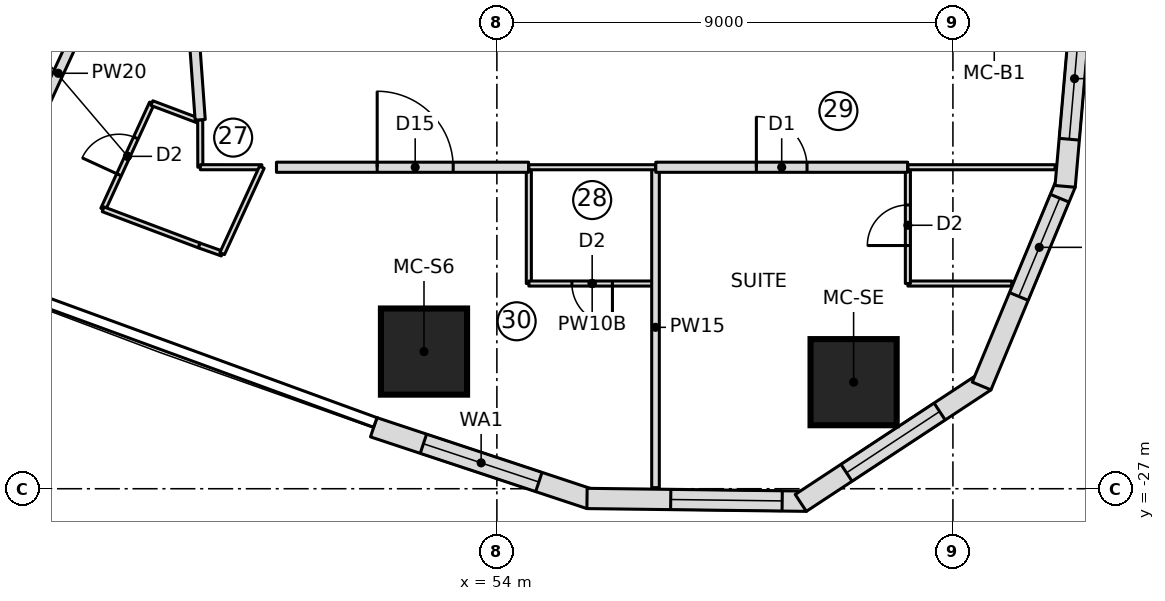
"""IFC4 building model, lengths in metres.
Left out: names, types, materials, properties, quantities, classifications, styles, units other than length and angle.
Written with IfcOpenShell. Run it as: python <this file> out.ifc"""

import sys

from ifc_helpers import new_model, si_unit, direction, frame, frame_2d, origin, origin_2d, place, context, subcontext, project, spatial, polyline, rectangle, outline, extrude, element, fill, save


model = new_model("IFC4")
c1 = context("Model", 3, precision=1e-05, world=origin(), true_north=direction((0.0, 1.0)))
c2 = subcontext(c1, "Body", "Model", "MODEL_VIEW")
j1 = project(units=[si_unit("LENGTHUNIT", "METRE"), si_unit("PLANEANGLEUNIT", "RADIAN")], contexts=[c1])
p1 = place(None, origin())
s1 = spatial("IfcSite", under=j1, at=p1, CompositionType="ELEMENT")
p2 = place(p1, origin())
s2 = spatial("IfcBuilding", under=s1, at=p2, CompositionType="ELEMENT")
p3 = place(p2, frame((0.0, 0.0, 88.45)))
s3 = spatial("IfcBuildingStorey", under=s2, at=p3, CompositionType="ELEMENT", Elevation=88.45)
for number, where, z_axis, x_axis in (
    (1, (52.562, -24.293, 0.0), (0.0, 0.0, 1.0), (1.0, 0.0, 0.0)),
    (2, (61.04, -24.897, 0.0), (0.0, 0.0, 1.0), (1.0, 0.0, 0.0)),
):
    element("IfcColumn", number, at=place(p3, frame(where, z_axis=z_axis, x_axis=x_axis)), inside=s3, PredefinedType="COLUMN", context=c2, shape_type="SweptSolid", body=[
        extrude(rectangle(XDim=1.7, YDim=1.7, at=origin_2d()), origin(), (0.0, 0.0, 1.0), 3.55),
    ])
p4 = place(p3, frame((51.569, -25.787, 0.0), z_axis=(0.0, 0.0, 1.0), x_axis=(0.94925004851, -0.314522408429, 0.0)))
e3 = element("IfcWall", 3, at=p4, inside=s3, PredefinedType="NOTDEFINED", context=c2, shape_type="SweptSolid", body=[
    extrude(outline(polyline([(0.0, -0.2), (4.499, -0.2), (4.437, 0.2), (0.0, 0.2), (0.0, -0.2)])), origin(), (0.0, 0.0, 1.0), 3.25),
])
p5 = place(p4, frame((1.034, 0.0, 0.5)))
e4 = element("IfcOpeningElement", 4, at=p5, cuts=e3, PredefinedType="OPENING", context=c2, shape_type="SweptSolid", body=[
    extrude(rectangle(XDim=2.4, YDim=2.0, at=frame_2d((1.2, 1.0))), frame((0.0, 0.21, 0.0), z_axis=(0.0, -1.0, 0.0), x_axis=(1.0, 0.0, 0.0)), (0.0, 0.0, 1.0), 0.42),
])
p6 = place(p3, frame((55.81, -27.192, 0.0), z_axis=(0.0, 0.0, 1.0), x_axis=(0.999919718849, -0.012671063772, 0.0)))
e5 = element("IfcWall", 5, at=p6, inside=s3, PredefinedType="NOTDEFINED", context=c2, shape_type="SweptSolid", body=[
    extrude(outline(polyline([(-0.031, -0.2), (4.3, -0.2), (4.177, 0.2), (0.031, 0.2), (-0.031, -0.2)])), origin(), (0.0, 0.0, 1.0), 3.25),
])
p7 = place(p6, frame((1.621, 0.0, 0.6)))
e6 = element("IfcOpeningElement", 6, at=p7, cuts=e5, PredefinedType="OPENING", context=c2, shape_type="SweptSolid", body=[
    extrude(outline(polyline([(0.0, 1.35), (0.084, 1.771), (0.322, 2.128), (0.679, 2.366), (1.1, 2.45), (1.521, 2.366), (1.878, 2.128), (2.116, 1.771), (2.2, 1.35), (2.2, 1.1), (2.116, 0.679), (1.878, 0.322), (1.521, 0.084), (1.1, 0.0), (0.679, 0.084), (0.322, 0.322), (0.084, 0.679), (0.0, 1.1), (0.0, 1.35)])), frame((0.0, 0.21, 0.0), z_axis=(0.0, -1.0, 0.0), x_axis=(1.0, 0.0, 0.0)), (0.0, 0.0, 1.0), 0.42),
])
p8 = place(p3, frame((60.049, -27.246, 0.0), z_axis=(0.0, 0.0, 1.0), x_axis=(0.835340523653, 0.549732852887, 0.0)))
e7 = element("IfcWall", 7, at=p8, inside=s3, PredefinedType="NOTDEFINED", context=c2, shape_type="SweptSolid", body=[
    extrude(outline(polyline([(-0.061, -0.2), (4.3, -0.2), (4.178, 0.2), (0.061, 0.2), (-0.061, -0.2)])), origin(), (0.0, 0.0, 1.0), 3.25),
])
p9 = place(p8, frame((1.02, 0.0, 0.6)))
e8 = element("IfcOpeningElement", 8, at=p9, cuts=e7, PredefinedType="OPENING", context=c2, shape_type="SweptSolid", body=[
    extrude(outline(polyline([(0.0, 1.35), (0.084, 1.771), (0.322, 2.128), (0.679, 2.366), (1.1, 2.45), (1.521, 2.366), (1.878, 2.128), (2.116, 1.771), (2.2, 1.35), (2.2, 1.1), (2.116, 0.679), (1.878, 0.322), (1.521, 0.084), (1.1, 0.0), (0.679, 0.084), (0.322, 0.322), (0.084, 0.679), (0.0, 1.1), (0.0, 1.35)])), frame((0.0, 0.21, 0.0), z_axis=(0.0, -1.0, 0.0), x_axis=(1.0, 0.0, 0.0)), (0.0, 0.0, 1.0), 0.42),
])
p10 = place(p3, frame((63.59, -24.916, 0.0), z_axis=(0.0, 0.0, 1.0), x_axis=(0.383997751971, 0.923334027577, 0.0)))
e9 = element("IfcWall", 9, at=p10, inside=s3, PredefinedType="NOTDEFINED", context=c2, shape_type="SweptSolid", body=[
    extrude(outline(polyline([(-0.061, -0.2), (4.27, -0.2), (4.208, 0.2), (0.061, 0.2), (-0.061, -0.2)])), origin(), (0.0, 0.0, 1.0), 3.25),
])
p11 = place(p10, frame((1.852, 0.0, 0.6)))
e10 = element("IfcOpeningElement", 10, at=p11, cuts=e9, PredefinedType="OPENING", context=c2, shape_type="SweptSolid", body=[
    extrude(outline(polyline([(0.0, 1.4), (0.08, 1.802), (0.308, 2.142), (0.648, 2.37), (1.05, 2.45), (1.452, 2.37), (1.792, 2.142), (2.02, 1.802), (2.1, 1.4), (2.1, 1.05), (2.02, 0.648), (1.792, 0.308), (1.452, 0.08), (1.05, 0.0), (0.648, 0.08), (0.308, 0.308), (0.08, 0.648), (0.0, 1.05), (0.0, 1.4)])), frame((0.0, 0.21, 0.0), z_axis=(0.0, -1.0, 0.0), x_axis=(1.0, 0.0, 0.0)), (0.0, 0.0, 1.0), 0.42),
])
p12 = place(p3, frame((65.217, -21.002, 0.0), z_axis=(0.0, 0.0, 1.0), x_axis=(0.086992730434, 0.996208946382, 0.0)))
e11 = element("IfcWall", 11, at=p12, inside=s3, PredefinedType="NOTDEFINED", context=c2, shape_type="SweptSolid", body=[
    extrude(outline(polyline([(-0.031, -0.2), (4.209, -0.2), (4.205, 0.2), (0.031, 0.2), (-0.031, -0.2)])), origin(), (0.0, 0.0, 1.0), 3.25),
])
p13 = place(p12, frame((0.903, 0.0, 0.5)))
e12 = element("IfcOpeningElement", 12, at=p13, cuts=e11, PredefinedType="OPENING", context=c2, shape_type="SweptSolid", body=[
    extrude(rectangle(XDim=2.4, YDim=2.0, at=frame_2d((1.2, 1.0))), frame((0.0, 0.21, 0.0), z_axis=(0.0, -1.0, 0.0), x_axis=(1.0, 0.0, 0.0)), (0.0, 0.0, 1.0), 0.42),
])
p14 = place(p3, frame((54.631, -22.95, 0.0), z_axis=(0.0, 0.0, 1.0), x_axis=(0.0, 1.0, 0.0)))
e13 = element("IfcWall", 13, at=p14, inside=s3, PredefinedType="PARTITIONING", context=c2, shape_type="SweptSolid", body=[
    extrude(rectangle(XDim=2.3, YDim=0.1, at=frame_2d((1.15, 0.0))), origin(), (0.0, 0.0, 1.0), 3.25),
])
p15 = place(p3, frame((57.131, -22.95, 0.0), z_axis=(0.0, 0.0, 1.0), x_axis=(-1.0, 0.0, 0.0)))
e14 = element("IfcWall", 14, at=p15, inside=s3, PredefinedType="PARTITIONING", context=c2, shape_type="SweptSolid", body=[
    extrude(rectangle(XDim=2.5, YDim=0.1, at=frame_2d((1.25, 0.0))), origin(), (0.0, 0.0, 1.0), 3.25),
])
p16 = place(p15, frame((0.85, 0.0, 0.0)))
e15 = element("IfcOpeningElement", 15, at=p16, cuts=e14, PredefinedType="OPENING", context=c2, shape_type="SweptSolid", body=[
    extrude(rectangle(XDim=0.8, YDim=2.1, at=frame_2d((0.4, 1.05))), frame((0.0, 0.06, 0.0), z_axis=(0.0, -1.0, 0.0), x_axis=(1.0, 0.0, 0.0)), (0.0, 0.0, 1.0), 0.12),
])
p17 = place(p3, frame((64.16, -22.95, 0.0), z_axis=(0.0, 0.0, 1.0), x_axis=(-1.0, 0.0, 0.0)))
e16 = element("IfcWall", 16, at=p17, inside=s3, PredefinedType="PARTITIONING", context=c2, shape_type="SweptSolid", body=[
    extrude(rectangle(XDim=2.049, YDim=0.1, at=frame_2d((1.025, 0.0))), origin(), (0.0, 0.0, 1.0), 3.25),
])
p18 = place(p3, frame((62.111, -22.95, 0.0), z_axis=(0.0, 0.0, 1.0), x_axis=(0.0, 1.0, 0.0)))
e17 = element("IfcWall", 17, at=p18, inside=s3, PredefinedType="PARTITIONING", context=c2, shape_type="SweptSolid", body=[
    extrude(rectangle(XDim=2.3, YDim=0.1, at=frame_2d((1.15, 0.0))), origin(), (0.0, 0.0, 1.0), 3.25),
])
p19 = place(p18, frame((0.75, 0.0, 0.0)))
e18 = element("IfcOpeningElement", 18, at=p19, cuts=e17, PredefinedType="OPENING", context=c2, shape_type="SweptSolid", body=[
    extrude(rectangle(XDim=0.8, YDim=2.1, at=frame_2d((0.4, 1.05))), frame((0.0, 0.06, 0.0), z_axis=(0.0, -1.0, 0.0), x_axis=(1.0, 0.0, 0.0)), (0.0, 0.0, 1.0), 0.12),
])
p20 = place(p3, frame((57.131, -26.979, 0.0), z_axis=(0.0, 0.0, 1.0), x_axis=(0.0, 1.0, 0.0)))
e19 = element("IfcWall", 19, at=p20, inside=s3, PredefinedType="PARTITIONING", context=c2, shape_type="SweptSolid", body=[
    extrude(rectangle(XDim=6.329, YDim=0.15, at=frame_2d((3.165, 0.0))), origin(), (0.0, 0.0, 1.0), 3.25),
])
p21 = place(p3, frame((43.752, -22.262, 0.0), z_axis=(0.0, 0.0, 1.0), x_axis=(0.417437957167, 0.908705426371, 0.0)))
e20 = element("IfcWall", 20, at=p21, inside=s3, PredefinedType="PARTITIONING", context=c2, shape_type="SweptSolid", body=[
    extrude(rectangle(XDim=7.619, YDim=0.2, at=frame_2d((3.81, 0.0))), origin(), (0.0, 0.0, 1.0), 3.25),
])
p22 = place(p3, frame((46.229, -21.485, 0.0), z_axis=(0.0, 0.0, 1.0), x_axis=(0.417405650341, 0.908720266674, 0.0)))
e21 = element("IfcWall", 21, at=p22, inside=s3, PredefinedType="PARTITIONING", context=c2, shape_type="SweptSolid", body=[
    extrude(rectangle(XDim=2.306, YDim=0.1, at=frame_2d((1.153, 0.0))), origin(), (0.0, 0.0, 1.0), 3.25),
])
p23 = place(p22, frame((0.75, 0.0, 0.0)))
e22 = element("IfcOpeningElement", 22, at=p23, cuts=e21, PredefinedType="OPENING", context=c2, shape_type="SweptSolid", body=[
    extrude(rectangle(XDim=0.8, YDim=2.1, at=frame_2d((0.4, 1.05))), frame((0.0, 0.06, 0.0), z_axis=(0.0, -1.0, 0.0), x_axis=(1.0, 0.0, 0.0)), (0.0, 0.0, 1.0), 0.12),
])
p24 = place(p3, frame((47.192, -19.39, 0.0), z_axis=(0.0, 0.0, 1.0), x_axis=(0.935855998994, -0.352382674301, 0.0)))
e23 = element("IfcWall", 23, at=p24, inside=s3, PredefinedType="PARTITIONING", context=c2, shape_type="SweptSolid", body=[
    extrude(rectangle(XDim=0.998, YDim=0.1, at=frame_2d((0.499, 0.0))), origin(), (0.0, 0.0, 1.0), 3.25),
])
p25 = place(p3, frame((48.579, -22.359, 0.0), z_axis=(0.0, 0.0, 1.0), x_axis=(-0.942878458172, 0.333136928476, 0.0)))
e24 = element("IfcWall", 24, at=p25, inside=s3, PredefinedType="PARTITIONING", context=c2, shape_type="SweptSolid", body=[
    extrude(rectangle(XDim=0.484, YDim=0.1, at=frame_2d((0.242, 0.0))), origin(), (0.0, 0.0, 1.0), 3.25),
])
p26 = place(p3, frame((48.123, -22.198, 0.0), z_axis=(0.0, 0.0, 1.0), x_axis=(-0.935872177073, 0.352339705654, 0.0)))
e25 = element("IfcWall", 25, at=p26, inside=s3, PredefinedType="PARTITIONING", context=c2, shape_type="SweptSolid", body=[
    extrude(rectangle(XDim=2.023, YDim=0.1, at=frame_2d((1.012, 0.0))), origin(), (0.0, 0.0, 1.0), 3.25),
])
p27 = place(p3, frame((49.65, -20.655, 0.0), z_axis=(0.0, 0.0, 1.0), x_axis=(1.0, 0.0, 0.0)))
e26 = element("IfcWall", 26, at=p27, inside=s3, PredefinedType="PARTITIONING", context=c2, shape_type="SweptSolid", body=[
    extrude(rectangle(XDim=4.976, YDim=0.2, at=frame_2d((2.488, 0.0))), origin(), (0.0, 0.0, 1.0), 3.25),
])
p28 = place(p27, frame((1.988, 0.0, 0.0)))
e27 = element("IfcOpeningElement", 27, at=p28, cuts=e26, PredefinedType="OPENING", context=c2, shape_type="SweptSolid", body=[
    extrude(rectangle(XDim=1.5, YDim=2.1, at=frame_2d((0.75, 1.05))), frame((0.0, 0.11, 0.0), z_axis=(0.0, -1.0, 0.0), x_axis=(1.0, 0.0, 0.0)), (0.0, 0.0, 1.0), 0.22),
])
p29 = place(p3, frame((57.135, -20.655, 0.0), z_axis=(0.0, 0.0, 1.0), x_axis=(1.0, 0.0, 0.0)))
e28 = element("IfcWall", 28, at=p29, inside=s3, PredefinedType="PARTITIONING", context=c2, shape_type="SweptSolid", body=[
    extrude(rectangle(XDim=4.971, YDim=0.2, at=frame_2d((2.485, 0.0))), origin(), (0.0, 0.0, 1.0), 3.25),
])
p30 = place(p29, frame((1.985, 0.0, 0.0)))
e29 = element("IfcOpeningElement", 29, at=p30, cuts=e28, PredefinedType="OPENING", context=c2, shape_type="SweptSolid", body=[
    extrude(rectangle(XDim=1.0, YDim=2.1, at=frame_2d((0.5, 1.05))), frame((0.0, 0.11, 0.0), z_axis=(0.0, -1.0, 0.0), x_axis=(1.0, 0.0, 0.0)), (0.0, 0.0, 1.0), 0.22),
])
p31 = place(p3, frame((54.631, -20.655, 0.0), z_axis=(0.0, 0.0, 1.0), x_axis=(1.0, 0.0, 0.0)))
e30 = element("IfcWall", 30, at=p31, inside=s3, PredefinedType="PARTITIONING", context=c2, shape_type="SweptSolid", body=[
    extrude(rectangle(XDim=2.5, YDim=0.1, at=frame_2d((1.25, 0.0))), origin(), (0.0, 0.0, 1.0), 3.25),
])
p32 = place(p3, frame((62.111, -20.655, 0.0), z_axis=(0.0, 0.0, 1.0), x_axis=(1.0, 0.0, 0.0)))
e31 = element("IfcWall", 31, at=p32, inside=s3, PredefinedType="PARTITIONING", context=c2, shape_type="SweptSolid", body=[
    extrude(rectangle(XDim=2.906, YDim=0.1, at=frame_2d((1.453, 0.0))), origin(), (0.0, 0.0, 1.0), 3.25),
])
p33 = place(p3, frame((48.145, -19.719, 0.0), z_axis=(0.0, 0.0, 1.0), x_axis=(0.002870551847, -0.999995879958, 0.0)))
e32 = element("IfcWall", 32, at=p33, inside=s3, PredefinedType="PARTITIONING", context=c2, shape_type="SweptSolid", body=[
    extrude(rectangle(XDim=0.936, YDim=0.1, at=frame_2d((0.468, 0.0))), origin(), (0.0, 0.0, 1.0), 3.25),
])
p34 = place(p3, frame((48.148, -20.654, 0.0), z_axis=(0.0, 0.0, 1.0), x_axis=(0.999999817967, -0.000603378812, 0.0)))
e33 = element("IfcWall", 33, at=p34, inside=s3, PredefinedType="PARTITIONING", context=c2, shape_type="SweptSolid", body=[
    extrude(rectangle(XDim=1.214, YDim=0.1, at=frame_2d((0.607, 0.0))), origin(), (0.0, 0.0, 1.0), 3.25),
])
p35 = place(p3, frame((49.362, -20.655, 0.0), z_axis=(0.0, 0.0, 1.0), x_axis=(-0.417439151459, -0.90870487774, 0.0)))
e34 = element("IfcWall", 34, at=p35, inside=s3, PredefinedType="PARTITIONING", context=c2, shape_type="SweptSolid", body=[
    extrude(rectangle(XDim=1.875, YDim=0.1, at=frame_2d((0.938, 0.0))), origin(), (0.0, 0.0, 1.0), 3.25),
])
p36 = place(p3, frame((47.855, -15.707, 0.0), z_axis=(0.0, 0.0, 1.0), x_axis=(0.072114108047, -0.997396388313, 0.0)))
e35 = element("IfcWall", 35, at=p36, inside=s3, PredefinedType="PARTITIONING", context=c2, shape_type="SweptSolid", body=[
    extrude(rectangle(XDim=4.022, YDim=0.2, at=frame_2d((2.011, 0.0))), origin(), (0.0, 0.0, 1.0), 3.25),
])
p37 = place(p36, frame((1.511, 0.0, 0.0)))
e36 = element("IfcOpeningElement", 36, at=p37, cuts=e35, PredefinedType="OPENING", context=c2, shape_type="SweptSolid", body=[
    extrude(rectangle(XDim=1.0, YDim=2.1, at=frame_2d((0.5, 1.05))), frame((0.0, 0.11, 0.0), z_axis=(0.0, -1.0, 0.0), x_axis=(1.0, 0.0, 0.0)), (0.0, 0.0, 1.0), 0.22),
])
p38 = place(p5, origin())
e37 = element("IfcWindow", 37, at=p38, inside=s3, PartitioningType="SINGLE_PANEL", PredefinedType="WINDOW", context=c2, shape_type="SweptSolid", body=[
    extrude(rectangle(XDim=2.4, YDim=2.0, at=frame_2d((1.2, 1.0))), frame((0.0, 0.17, 0.0), z_axis=(0.0, -1.0, 0.0), x_axis=(1.0, 0.0, 0.0)), (0.0, 0.0, 1.0), 0.06),
])
fill(e4, e37)
p39 = place(p7, origin())
e38 = element("IfcWindow", 38, at=p39, inside=s3, PartitioningType="SINGLE_PANEL", PredefinedType="WINDOW", context=c2, shape_type="SweptSolid", body=[
    extrude(outline(polyline([(0.0, 1.35), (0.084, 1.771), (0.322, 2.128), (0.679, 2.366), (1.1, 2.45), (1.521, 2.366), (1.878, 2.128), (2.116, 1.771), (2.2, 1.35), (2.2, 1.1), (2.116, 0.679), (1.878, 0.322), (1.521, 0.084), (1.1, 0.0), (0.679, 0.084), (0.322, 0.322), (0.084, 0.679), (0.0, 1.1), (0.0, 1.35)])), frame((0.0, 0.17, 0.0), z_axis=(0.0, -1.0, 0.0), x_axis=(1.0, 0.0, 0.0)), (0.0, 0.0, 1.0), 0.06),
])
fill(e6, e38)
p40 = place(p9, origin())
e39 = element("IfcWindow", 39, at=p40, inside=s3, PartitioningType="SINGLE_PANEL", PredefinedType="WINDOW", context=c2, shape_type="SweptSolid", body=[
    extrude(outline(polyline([(0.0, 1.35), (0.084, 1.771), (0.322, 2.128), (0.679, 2.366), (1.1, 2.45), (1.521, 2.366), (1.878, 2.128), (2.116, 1.771), (2.2, 1.35), (2.2, 1.1), (2.116, 0.679), (1.878, 0.322), (1.521, 0.084), (1.1, 0.0), (0.679, 0.084), (0.322, 0.322), (0.084, 0.679), (0.0, 1.1), (0.0, 1.35)])), frame((0.0, 0.17, 0.0), z_axis=(0.0, -1.0, 0.0), x_axis=(1.0, 0.0, 0.0)), (0.0, 0.0, 1.0), 0.06),
])
fill(e8, e39)
p41 = place(p11, origin())
e40 = element("IfcWindow", 40, at=p41, inside=s3, PartitioningType="SINGLE_PANEL", PredefinedType="WINDOW", context=c2, shape_type="SweptSolid", body=[
    extrude(outline(polyline([(0.0, 1.4), (0.08, 1.802), (0.308, 2.142), (0.648, 2.37), (1.05, 2.45), (1.452, 2.37), (1.792, 2.142), (2.02, 1.802), (2.1, 1.4), (2.1, 1.05), (2.02, 0.648), (1.792, 0.308), (1.452, 0.08), (1.05, 0.0), (0.648, 0.08), (0.308, 0.308), (0.08, 0.648), (0.0, 1.05), (0.0, 1.4)])), frame((0.0, 0.17, 0.0), z_axis=(0.0, -1.0, 0.0), x_axis=(1.0, 0.0, 0.0)), (0.0, 0.0, 1.0), 0.06),
])
fill(e10, e40)
p42 = place(p13, origin())
e41 = element("IfcWindow", 41, at=p42, inside=s3, PartitioningType="SINGLE_PANEL", PredefinedType="WINDOW", context=c2, shape_type="SweptSolid", body=[
    extrude(rectangle(XDim=2.4, YDim=2.0, at=frame_2d((1.2, 1.0))), frame((0.0, 0.17, 0.0), z_axis=(0.0, -1.0, 0.0), x_axis=(1.0, 0.0, 0.0)), (0.0, 0.0, 1.0), 0.06),
])
fill(e12, e41)
p43 = place(p16, origin())
e42 = element("IfcDoor", 42, at=p43, inside=s3, OperationType="SINGLE_SWING_LEFT", PredefinedType="DOOR", context=c2, shape_type="SweptSolid", body=[
    extrude(rectangle(XDim=0.8, YDim=2.1, at=frame_2d((0.4, 1.05))), frame((0.0, 0.025, 0.0), z_axis=(0.0, -1.0, 0.0), x_axis=(1.0, 0.0, 0.0)), (0.0, 0.0, 1.0), 0.05),
])
fill(e15, e42)
p44 = place(p19, origin())
e43 = element("IfcDoor", 43, at=p44, inside=s3, OperationType="SINGLE_SWING_LEFT", PredefinedType="DOOR", context=c2, shape_type="SweptSolid", body=[
    extrude(rectangle(XDim=0.8, YDim=2.1, at=frame_2d((0.4, 1.05))), frame((0.0, 0.025, 0.0), z_axis=(0.0, -1.0, 0.0), x_axis=(1.0, 0.0, 0.0)), (0.0, 0.0, 1.0), 0.05),
])
fill(e18, e43)
p45 = place(p23, origin())
e44 = element("IfcDoor", 44, at=p45, inside=s3, OperationType="SINGLE_SWING_LEFT", PredefinedType="DOOR", context=c2, shape_type="SweptSolid", body=[
    extrude(rectangle(XDim=0.8, YDim=2.1, at=frame_2d((0.4, 1.05))), frame((0.0, 0.025, 0.0), z_axis=(0.0, -1.0, 0.0), x_axis=(1.0, 0.0, 0.0)), (0.0, 0.0, 1.0), 0.05),
])
fill(e22, e44)
p46 = place(p28, origin())
e45 = element("IfcDoor", 45, at=p46, inside=s3, OperationType="DOUBLE_DOOR_SINGLE_SWING", PredefinedType="DOOR", context=c2, shape_type="SweptSolid", body=[
    extrude(rectangle(XDim=1.5, YDim=2.1, at=frame_2d((0.75, 1.05))), frame((0.0, 0.025, 0.0), z_axis=(0.0, -1.0, 0.0), x_axis=(1.0, 0.0, 0.0)), (0.0, 0.0, 1.0), 0.05),
])
fill(e27, e45)
p47 = place(p30, origin())
e46 = element("IfcDoor", 46, at=p47, inside=s3, OperationType="SINGLE_SWING_LEFT", PredefinedType="DOOR", context=c2, shape_type="SweptSolid", body=[
    extrude(rectangle(XDim=1.0, YDim=2.1, at=frame_2d((0.5, 1.05))), frame((0.0, 0.025, 0.0), z_axis=(0.0, -1.0, 0.0), x_axis=(1.0, 0.0, 0.0)), (0.0, 0.0, 1.0), 0.05),
])
fill(e29, e46)
save(model, sys.argv[1])
